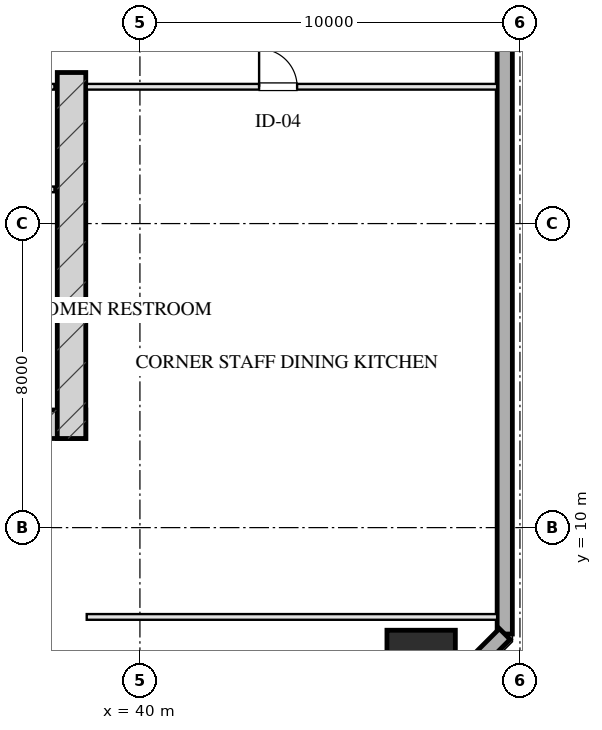
"""IFC4 building model, lengths in metres.
Left out: names, types, materials, properties, quantities, classifications, styles, units other than length and angle.
Written with IfcOpenShell. Run it as: python <this file> out.ifc"""

import sys

from ifc_helpers import new_model, si_unit, direction, frame, frame_2d, origin, origin_2d, place, context, subcontext, project, spatial, rectangle, hollow_rectangle, extrude, element, fill, save


model = new_model("IFC4")
c1 = context("Model", 3, precision=1e-05, world=origin(), true_north=direction((0.0, 1.0)))
c2 = subcontext(c1, "Body", "Model", "MODEL_VIEW")
j1 = project(units=[si_unit("LENGTHUNIT", "METRE"), si_unit("PLANEANGLEUNIT", "RADIAN")], contexts=[c1])
p1 = place(None, origin())
s1 = spatial("IfcSite", under=j1, at=p1, CompositionType="ELEMENT")
p2 = place(p1, origin())
s2 = spatial("IfcBuilding", under=s1, at=p2, CompositionType="ELEMENT")
p3 = place(p2, frame((0.0, 0.0, 67.85)))
s3 = spatial("IfcBuildingStorey", under=s2, at=p3, CompositionType="ELEMENT", Elevation=67.85)
p4 = place(p3, frame((21.425, 12.72, 0.0), z_axis=(0.0, 0.0, 1.0), x_axis=(1.0, 0.0, 0.0)))
e1 = element("IfcWall", 1, at=p4, inside=s3, PredefinedType="SHEAR", context=c2, shape_type="SweptSolid", body=[
    extrude(rectangle(XDim=17.15, YDim=0.75, at=frame_2d((8.575, 0.0))), origin(), (0.0, 0.0, 1.0), 3.45),
])
p5 = place(p3, frame((38.2, 21.975, 0.0), z_axis=(0.0, 0.0, 1.0), x_axis=(0.0, -1.0, 0.0)))
e2 = element("IfcWall", 2, at=p5, inside=s3, PredefinedType="SHEAR", context=c2, shape_type="SweptSolid", body=[
    extrude(rectangle(XDim=9.63, YDim=0.75, at=frame_2d((4.815, 0.0))), origin(), (0.0, 0.0, 1.0), 3.45),
])
p6 = place(p3, frame((47.4, 6.4, 0.0), z_axis=(0.0, 0.0, 1.0), x_axis=(1.0, 0.0, 0.0)))
e3 = element("IfcColumn", 3, at=p6, inside=s3, PredefinedType="COLUMN", context=c2, shape_type="SweptSolid", body=[
    extrude(hollow_rectangle(XDim=1.8, YDim=1.8, WallThickness=0.06, at=origin_2d()), origin(), (0.0, 0.0, 1.0), 3.451),
])
p7 = place(p3, frame((49.6, 60.8, 0.0), z_axis=(0.0, 0.0, 1.0), x_axis=(0.0, -1.0, 0.0)))
e4 = element("IfcWall", 4, at=p7, inside=s3, PredefinedType="SOLIDWALL", context=c2, shape_type="SweptSolid", body=[
    extrude(rectangle(XDim=53.6, YDim=0.4, at=frame_2d((26.8, 0.0))), origin(), (0.0, 0.0, 1.0), 2.61),
])
p8 = place(p7, frame((22.95, 0.0, 0.75)))
e5 = element("IfcOpeningElement", 5, at=p8, cuts=e4, PredefinedType="OPENING", context=c2, shape_type="SweptSolid", body=[
    extrude(rectangle(XDim=2.5, YDim=1.46, at=frame_2d((1.25, 0.73))), frame((0.0, 0.21, 0.0), z_axis=(0.0, -1.0, 0.0), x_axis=(1.0, 0.0, 0.0)), (0.0, 0.0, 1.0), 0.42),
])
p9 = place(p7, frame((29.35, 0.0, 0.0)))
e6 = element("IfcOpeningElement", 6, at=p9, cuts=e4, PredefinedType="OPENING", context=c2, shape_type="SweptSolid", body=[
    extrude(rectangle(XDim=1.1, YDim=2.15, at=frame_2d((0.55, 1.075))), frame((0.0, 0.21, 0.0), z_axis=(0.0, -1.0, 0.0), x_axis=(1.0, 0.0, 0.0)), (0.0, 0.0, 1.0), 0.42),
])
p10 = place(p3, frame((49.6, 7.2, 0.0), z_axis=(0.0, 0.0, 1.0), x_axis=(-0.707106781187, -0.707106781187, 0.0)))
e7 = element("IfcWall", 7, at=p10, inside=s3, PredefinedType="SOLIDWALL", context=c2, shape_type="SweptSolid", body=[
    extrude(rectangle(XDim=4.243, YDim=0.4, at=frame_2d((2.121, 0.0))), origin(), (0.0, 0.0, 1.0), 2.61),
])
p11 = place(p3, frame((33.95, 21.6, 0.0), z_axis=(0.0, 0.0, 1.0), x_axis=(1.0, 0.0, 0.0)))
e8 = element("IfcWall", 8, at=p11, inside=s3, PredefinedType="PARTITIONING", context=c2, shape_type="SweptSolid", body=[
    extrude(rectangle(XDim=3.8, YDim=0.15, at=frame_2d((1.9, 0.0))), origin(), (0.0, 0.0, 1.0), 3.175),
])
p12 = place(p11, frame((0.45, 0.0, 0.0)))
e9 = element("IfcOpeningElement", 9, at=p12, cuts=e8, PredefinedType="OPENING", context=c2, shape_type="SweptSolid", body=[
    extrude(rectangle(XDim=0.95, YDim=2.05, at=frame_2d((0.475, 1.025))), frame((0.0, 0.085, 0.0), z_axis=(0.0, -1.0, 0.0), x_axis=(1.0, 0.0, 0.0)), (0.0, 0.0, 1.0), 0.17),
])
p13 = place(p3, frame((33.95, 18.9, 0.0), z_axis=(0.0, 0.0, 1.0), x_axis=(1.0, 0.0, 0.0)))
e10 = element("IfcWall", 10, at=p13, inside=s3, PredefinedType="PARTITIONING", context=c2, shape_type="SweptSolid", body=[
    extrude(rectangle(XDim=3.8, YDim=0.15, at=frame_2d((1.9, 0.0))), origin(), (0.0, 0.0, 1.0), 3.175),
])
p14 = place(p13, frame((0.35, 0.0, 0.0)))
e11 = element("IfcOpeningElement", 11, at=p14, cuts=e10, PredefinedType="OPENING", context=c2, shape_type="SweptSolid", body=[
    extrude(rectangle(XDim=0.9, YDim=2.05, at=frame_2d((0.45, 1.025))), frame((0.0, 0.085, 0.0), z_axis=(0.0, -1.0, 0.0), x_axis=(1.0, 0.0, 0.0)), (0.0, 0.0, 1.0), 0.17),
])
p15 = place(p13, frame((2.1, 0.0, 0.0)))
e12 = element("IfcOpeningElement", 12, at=p15, cuts=e10, PredefinedType="OPENING", context=c2, shape_type="SweptSolid", body=[
    extrude(rectangle(XDim=0.9, YDim=2.05, at=frame_2d((0.45, 1.025))), frame((0.0, 0.085, 0.0), z_axis=(0.0, -1.0, 0.0), x_axis=(1.0, 0.0, 0.0)), (0.0, 0.0, 1.0), 0.17),
])
p16 = place(p3, frame((38.6, 7.65, 0.0), z_axis=(0.0, 0.0, 1.0), x_axis=(1.0, 0.0, 0.0)))
e13 = element("IfcWall", 13, at=p16, inside=s3, PredefinedType="PARTITIONING", context=c2, shape_type="SweptSolid", body=[
    extrude(rectangle(XDim=10.8, YDim=0.15, at=frame_2d((5.4, 0.0))), origin(), (0.0, 0.0, 1.0), 3.175),
])
p17 = place(p3, frame((38.6, 21.6, 0.0), z_axis=(0.0, 0.0, 1.0), x_axis=(1.0, 0.0, 0.0)))
e14 = element("IfcWall", 14, at=p17, inside=s3, PredefinedType="PARTITIONING", context=c2, shape_type="SweptSolid", body=[
    extrude(rectangle(XDim=10.8, YDim=0.15, at=frame_2d((5.4, 0.0))), origin(), (0.0, 0.0, 1.0), 3.175),
])
p18 = place(p17, frame((4.536, 0.0, 0.0)))
e15 = element("IfcOpeningElement", 15, at=p18, cuts=e14, PredefinedType="OPENING", context=c2, shape_type="SweptSolid", body=[
    extrude(rectangle(XDim=1.0, YDim=2.05, at=frame_2d((0.5, 1.025))), frame((0.0, 0.085, 0.0), z_axis=(0.0, -1.0, 0.0), x_axis=(1.0, 0.0, 0.0)), (0.0, 0.0, 1.0), 0.17),
])
p19 = place(p18, origin())
e16 = element("IfcDoor", 16, at=p19, inside=s3, OperationType="SINGLE_SWING_LEFT", PredefinedType="DOOR", context=c2, shape_type="SweptSolid", body=[
    extrude(rectangle(XDim=1.0, YDim=2.05, at=frame_2d((0.5, 1.025))), frame((0.0, 0.025, 0.0), z_axis=(0.0, -1.0, 0.0), x_axis=(1.0, 0.0, 0.0)), (0.0, 0.0, 1.0), 0.05),
])
fill(e15, e16)
save(model, sys.argv[1])
